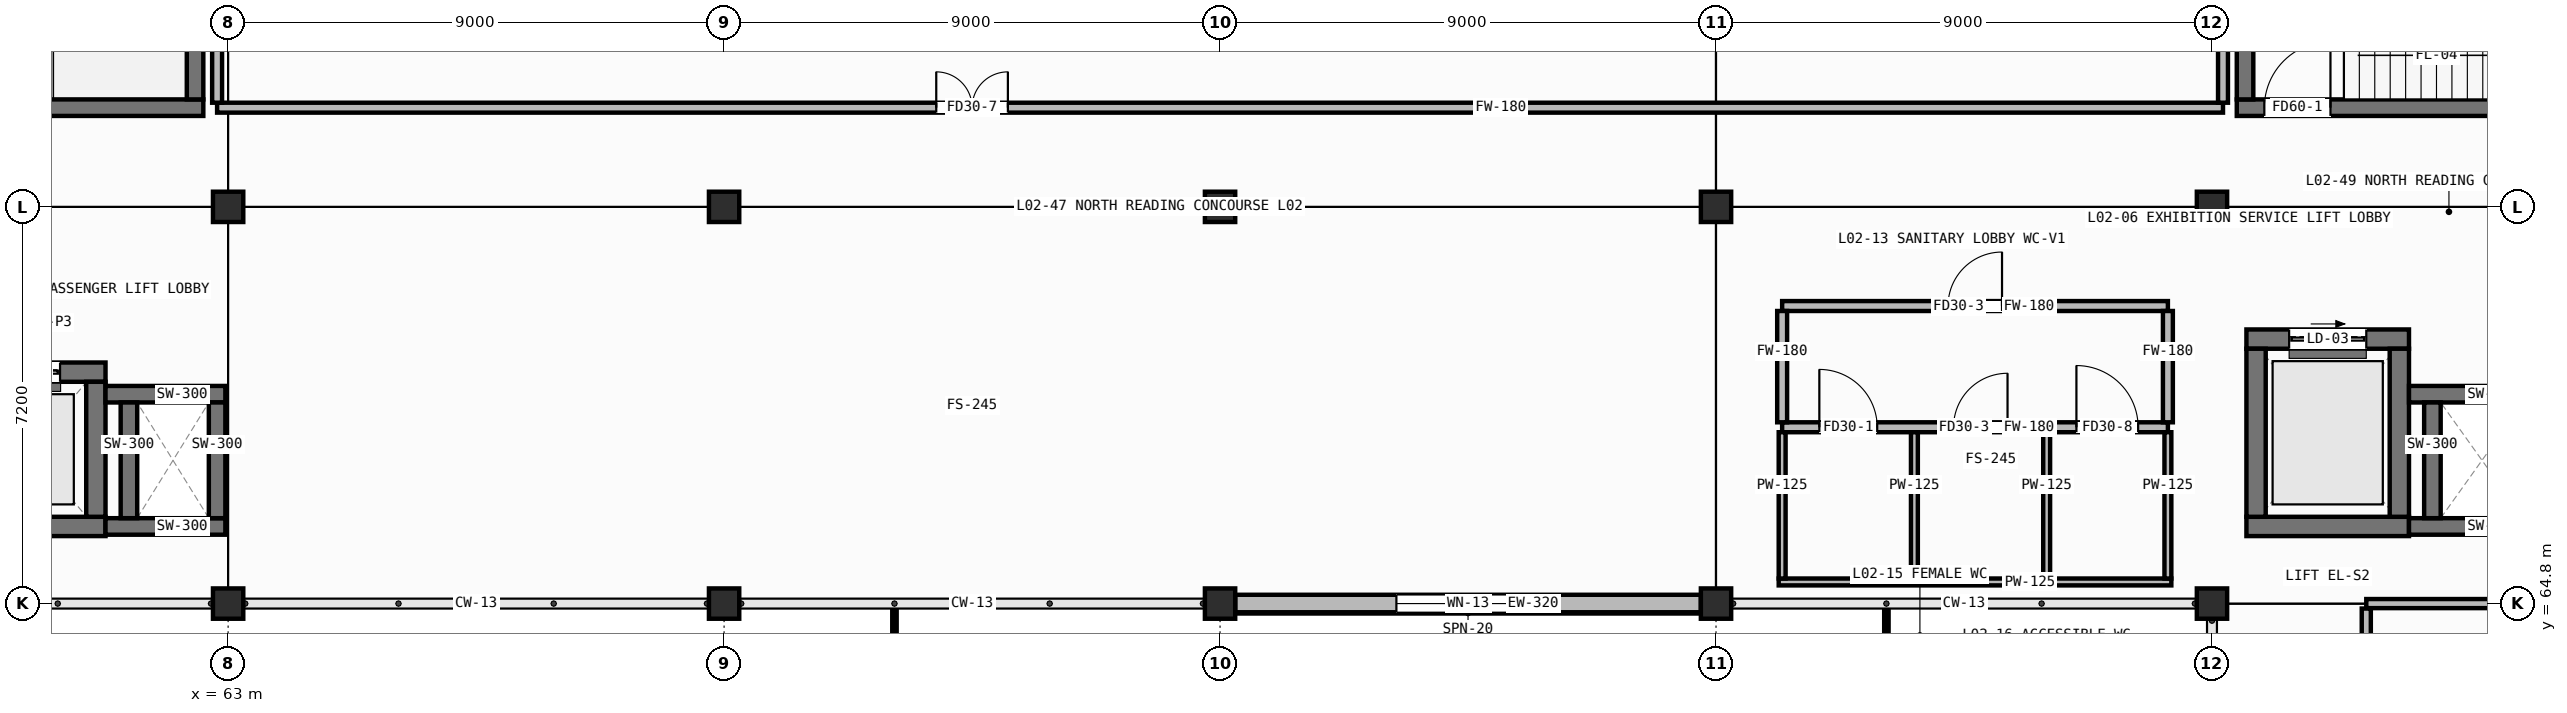
"""IFC4 building model, lengths in metres.
Left out: names, types, materials, properties, quantities, classifications, styles, units other than length and angle.
Written with IfcOpenShell. Run it as: python <this file> out.ifc"""

import sys

from ifc_helpers import new_model, si_unit, direction, frame, frame_2d, origin, origin_2d, place, context, subcontext, project, spatial, rectangle, hollow_rectangle, extrude, element, fill, save


model = new_model("IFC4")
c1 = context("Model", 3, precision=1e-05, world=origin(), true_north=direction((0.0, 1.0)))
c2 = subcontext(c1, "Body", "Model", "MODEL_VIEW")
j1 = project(units=[si_unit("LENGTHUNIT", "METRE"), si_unit("PLANEANGLEUNIT", "RADIAN")], contexts=[c1])
p1 = place(None, origin())
s1 = spatial("IfcSite", under=j1, at=p1, CompositionType="ELEMENT")
p2 = place(p1, origin())
s2 = spatial("IfcBuilding", under=s1, at=p2, CompositionType="ELEMENT")
p3 = place(p2, frame((0.0, 0.0, 4.8)))
s3 = spatial("IfcBuildingStorey", under=s2, at=p3, CompositionType="ELEMENT", Elevation=4.8)
for number, where, z_axis, x_axis in (
    (1, (63.0, 64.8, 0.0), (0.0, 0.0, 1.0), (1.0, 0.0, 0.0)),
    (2, (63.0, 72.0, 0.0), (0.0, 0.0, 1.0), (1.0, 0.0, 0.0)),
    (3, (72.0, 64.8, 0.0), (0.0, 0.0, 1.0), (1.0, 0.0, 0.0)),
    (4, (72.0, 72.0, 0.0), (0.0, 0.0, 1.0), (1.0, 0.0, 0.0)),
    (5, (81.0, 64.8, 0.0), (0.0, 0.0, 1.0), (1.0, 0.0, 0.0)),
    (6, (81.0, 72.0, 0.0), (0.0, 0.0, 1.0), (1.0, 0.0, 0.0)),
    (7, (90.0, 64.8, 0.0), (0.0, 0.0, 1.0), (1.0, 0.0, 0.0)),
    (8, (90.0, 72.0, 0.0), (0.0, 0.0, 1.0), (1.0, 0.0, 0.0)),
    (9, (99.0, 64.8, 0.0), (0.0, 0.0, 1.0), (1.0, 0.0, 0.0)),
    (10, (99.0, 72.0, 0.0), (0.0, 0.0, 1.0), (1.0, 0.0, 0.0)),
):
    element("IfcColumn", number, at=place(p3, frame(where, z_axis=z_axis, x_axis=x_axis)), inside=s3, PredefinedType="COLUMN", context=c2, shape_type="SweptSolid", body=[
        extrude(hollow_rectangle(XDim=0.55, YDim=0.55, WallThickness=0.022, at=origin_2d()), origin(), (0.0, 0.0, 1.0), 4.0),
    ])
p4 = place(p3, frame((81.275, 64.8, 0.0), z_axis=(0.0, 0.0, 1.0), x_axis=(1.0, 0.0, 0.0)))
e11 = element("IfcWall", 11, at=p4, inside=s3, PredefinedType="STANDARD", context=c2, shape_type="SweptSolid", body=[
    extrude(rectangle(XDim=8.45, YDim=0.32, at=frame_2d((4.225, 0.0))), origin(), (0.0, 0.0, 1.0), 3.255),
])
p5 = place(p4, frame((2.925, 0.0, 0.85)))
e12 = element("IfcOpeningElement", 12, at=p5, cuts=e11, PredefinedType="OPENING", context=c2, shape_type="SweptSolid", body=[
    extrude(rectangle(XDim=2.6, YDim=1.6, at=frame_2d((1.3, 0.8))), frame((0.0, 0.172, 0.0), z_axis=(0.0, -1.0, 0.0), x_axis=(1.0, 0.0, 0.0)), (0.0, 0.0, 1.0), 0.344),
])
p6 = place(p3, frame((54.45, 73.8, 0.0), z_axis=(0.0, 0.0, 1.0), x_axis=(1.0, 0.0, 0.0)))
e13 = element("IfcWall", 13, at=p6, inside=s3, PredefinedType="SHEAR", context=c2, shape_type="SweptSolid", body=[
    extrude(rectangle(XDim=8.1, YDim=0.3, at=frame_2d((4.05, 0.0))), origin(), (0.0, 0.0, 1.0), 3.755),
])
p7 = place(p6, frame((0.5, 0.0, 0.0)))
e14 = element("IfcOpeningElement", 14, at=p7, cuts=e13, PredefinedType="OPENING", context=c2, shape_type="SweptSolid", body=[
    extrude(rectangle(XDim=1.2, YDim=2.1, at=frame_2d((0.6, 1.05))), frame((0.0, 0.162, 0.0), z_axis=(0.0, -1.0, 0.0), x_axis=(1.0, 0.0, 0.0)), (0.0, 0.0, 1.0), 0.324),
])
p8 = place(p3, frame((62.4, 73.95, 0.0), z_axis=(0.0, 0.0, 1.0), x_axis=(0.0, 1.0, 0.0)))
e15 = element("IfcWall", 15, at=p8, inside=s3, PredefinedType="SHEAR", context=c2, shape_type="SweptSolid", body=[
    extrude(rectangle(XDim=3.8, YDim=0.3, at=frame_2d((1.9, 0.0))), origin(), (0.0, 0.0, 1.0), 3.755),
])
p9 = place(p3, frame((99.45, 73.8, 0.0), z_axis=(0.0, 0.0, 1.0), x_axis=(1.0, 0.0, 0.0)))
e16 = element("IfcWall", 16, at=p9, inside=s3, PredefinedType="SHEAR", context=c2, shape_type="SweptSolid", body=[
    extrude(rectangle(XDim=8.1, YDim=0.3, at=frame_2d((4.05, 0.0))), origin(), (0.0, 0.0, 1.0), 3.755),
])
p10 = place(p9, frame((0.5, 0.0, 0.0)))
e17 = element("IfcOpeningElement", 17, at=p10, cuts=e16, PredefinedType="OPENING", context=c2, shape_type="SweptSolid", body=[
    extrude(rectangle(XDim=1.2, YDim=2.1, at=frame_2d((0.6, 1.05))), frame((0.0, 0.162, 0.0), z_axis=(0.0, -1.0, 0.0), x_axis=(1.0, 0.0, 0.0)), (0.0, 0.0, 1.0), 0.324),
])
p11 = place(p3, frame((99.6, 73.95, 0.0), z_axis=(0.0, 0.0, 1.0), x_axis=(0.0, 1.0, 0.0)))
e18 = element("IfcWall", 18, at=p11, inside=s3, PredefinedType="SHEAR", context=c2, shape_type="SweptSolid", body=[
    extrude(rectangle(XDim=3.8, YDim=0.3, at=frame_2d((1.9, 0.0))), origin(), (0.0, 0.0, 1.0), 3.755),
])
p12 = place(p3, frame((58.025, 66.2, 0.0), z_axis=(0.0, 0.0, 1.0), x_axis=(1.0, 0.0, 0.0)))
e19 = element("IfcWall", 19, at=p12, inside=s3, PredefinedType="SHEAR", context=c2, shape_type="SweptSolid", body=[
    extrude(rectangle(XDim=2.75, YDim=0.35, at=frame_2d((1.375, 0.0))), origin(), (0.0, 0.0, 1.0), 3.755),
])
p13 = place(p3, frame((58.025, 69.0, 0.0), z_axis=(0.0, 0.0, 1.0), x_axis=(1.0, 0.0, 0.0)))
e20 = element("IfcWall", 20, at=p13, inside=s3, PredefinedType="SHEAR", context=c2, shape_type="SweptSolid", body=[
    extrude(rectangle(XDim=2.75, YDim=0.35, at=frame_2d((1.375, 0.0))), origin(), (0.0, 0.0, 1.0), 3.755),
])
p14 = place(p13, frame((0.825, 0.0, 0.0)))
e21 = element("IfcOpeningElement", 21, at=p14, cuts=e20, PredefinedType="OPENING", context=c2, shape_type="SweptSolid", body=[
    extrude(rectangle(XDim=1.1, YDim=2.1, at=frame_2d((0.55, 1.05))), frame((0.0, 0.187, 0.0), z_axis=(0.0, -1.0, 0.0), x_axis=(1.0, 0.0, 0.0)), (0.0, 0.0, 1.0), 0.374),
])
p15 = place(p3, frame((60.6, 66.375, 0.0), z_axis=(0.0, 0.0, 1.0), x_axis=(0.0, 1.0, 0.0)))
e22 = element("IfcWall", 22, at=p15, inside=s3, PredefinedType="SHEAR", context=c2, shape_type="SweptSolid", body=[
    extrude(rectangle(XDim=2.45, YDim=0.35, at=frame_2d((1.225, 0.0))), origin(), (0.0, 0.0, 1.0), 3.755),
])
p16 = place(p3, frame((99.625, 66.2, 0.0), z_axis=(0.0, 0.0, 1.0), x_axis=(1.0, 0.0, 0.0)))
e23 = element("IfcWall", 23, at=p16, inside=s3, PredefinedType="SHEAR", context=c2, shape_type="SweptSolid", body=[
    extrude(rectangle(XDim=2.95, YDim=0.35, at=frame_2d((1.475, 0.0))), origin(), (0.0, 0.0, 1.0), 3.755),
])
p17 = place(p3, frame((99.625, 69.6, 0.0), z_axis=(0.0, 0.0, 1.0), x_axis=(1.0, 0.0, 0.0)))
e24 = element("IfcWall", 24, at=p17, inside=s3, PredefinedType="SHEAR", context=c2, shape_type="SweptSolid", body=[
    extrude(rectangle(XDim=2.95, YDim=0.35, at=frame_2d((1.475, 0.0))), origin(), (0.0, 0.0, 1.0), 3.755),
])
p18 = place(p17, frame((0.775, 0.0, 0.0)))
e25 = element("IfcOpeningElement", 25, at=p18, cuts=e24, PredefinedType="OPENING", context=c2, shape_type="SweptSolid", body=[
    extrude(rectangle(XDim=1.4, YDim=2.15, at=frame_2d((0.7, 1.075))), frame((0.0, 0.187, 0.0), z_axis=(0.0, -1.0, 0.0), x_axis=(1.0, 0.0, 0.0)), (0.0, 0.0, 1.0), 0.374),
])
for number, where, z_axis, x_axis in (
    (26, (99.8, 66.375, 0.0), (0.0, 0.0, 1.0), (0.0, 1.0, 0.0)),
    (27, (102.4, 66.375, 0.0), (0.0, 0.0, 1.0), (0.0, 1.0, 0.0)),
):
    element("IfcWall", number, at=place(p3, frame(where, z_axis=z_axis, x_axis=x_axis)), inside=s3, PredefinedType="SHEAR", context=c2, shape_type="SweptSolid", body=[
        extrude(rectangle(XDim=3.05, YDim=0.35, at=frame_2d((1.525, 0.0))), origin(), (0.0, 0.0, 1.0), 3.755),
    ])
for number, where, z_axis, x_axis in (
    (28, (60.775, 66.2, 0.0), (0.0, 0.0, 1.0), (1.0, 0.0, 0.0)),
    (29, (60.775, 68.6, 0.0), (0.0, 0.0, 1.0), (1.0, 0.0, 0.0)),
):
    element("IfcWall", number, at=place(p3, frame(where, z_axis=z_axis, x_axis=x_axis)), inside=s3, PredefinedType="SHEAR", context=c2, shape_type="SweptSolid", body=[
        extrude(rectangle(XDim=2.175, YDim=0.3, at=frame_2d((1.087, 0.0))), origin(), (0.0, 0.0, 1.0), 3.755),
    ])
for number, where, z_axis, x_axis in (
    (30, (61.2, 66.35, 0.0), (0.0, 0.0, 1.0), (0.0, 1.0, 0.0)),
    (31, (62.8, 66.35, 0.0), (0.0, 0.0, 1.0), (0.0, 1.0, 0.0)),
):
    element("IfcWall", number, at=place(p3, frame(where, z_axis=z_axis, x_axis=x_axis)), inside=s3, PredefinedType="SHEAR", context=c2, shape_type="SweptSolid", body=[
        extrude(rectangle(XDim=2.1, YDim=0.3, at=frame_2d((1.05, 0.0))), origin(), (0.0, 0.0, 1.0), 3.755),
    ])
for number, where, z_axis, x_axis in (
    (32, (102.575, 66.2, 0.0), (0.0, 0.0, 1.0), (1.0, 0.0, 0.0)),
    (33, (102.575, 68.6, 0.0), (0.0, 0.0, 1.0), (1.0, 0.0, 0.0)),
):
    element("IfcWall", number, at=place(p3, frame(where, z_axis=z_axis, x_axis=x_axis)), inside=s3, PredefinedType="SHEAR", context=c2, shape_type="SweptSolid", body=[
        extrude(rectangle(XDim=2.375, YDim=0.3, at=frame_2d((1.188, 0.0))), origin(), (0.0, 0.0, 1.0), 3.755),
    ])
p19 = place(p3, frame((103.0, 66.35, 0.0), z_axis=(0.0, 0.0, 1.0), x_axis=(0.0, 1.0, 0.0)))
e34 = element("IfcWall", 34, at=p19, inside=s3, PredefinedType="SHEAR", context=c2, shape_type="SweptSolid", body=[
    extrude(rectangle(XDim=2.1, YDim=0.3, at=frame_2d((1.05, 0.0))), origin(), (0.0, 0.0, 1.0), 3.755),
])
p20 = place(p3, frame((91.137, 65.192, 0.0), z_axis=(0.0, 0.0, 1.0), x_axis=(1.0, 0.0, 0.0)))
e35 = element("IfcWall", 35, at=p20, inside=s3, PredefinedType="PARTITIONING", context=c2, shape_type="SweptSolid", body=[
    extrude(rectangle(XDim=7.125, YDim=0.125, at=frame_2d((3.562, 0.0))), origin(), (0.0, 0.0, 1.0), 3.755),
])
p21 = place(p3, frame((91.2, 68.0, 0.0), z_axis=(0.0, 0.0, 1.0), x_axis=(1.0, 0.0, 0.0)))
e36 = element("IfcWall", 36, at=p21, inside=s3, PredefinedType="PARTITIONING", context=c2, shape_type="SweptSolid", body=[
    extrude(rectangle(XDim=7.0, YDim=0.18, at=frame_2d((3.5, 0.0))), origin(), (0.0, 0.0, 1.0), 3.755),
])
p22 = place(p21, frame((0.675, 0.0, 0.0)))
e37 = element("IfcOpeningElement", 37, at=p22, cuts=e36, PredefinedType="OPENING", context=c2, shape_type="SweptSolid", body=[
    extrude(rectangle(XDim=1.05, YDim=2.1, at=frame_2d((0.525, 1.05))), frame((0.0, 0.102, 0.0), z_axis=(0.0, -1.0, 0.0), x_axis=(1.0, 0.0, 0.0)), (0.0, 0.0, 1.0), 0.204),
])
p23 = place(p21, frame((3.11, 0.0, 0.0)))
e38 = element("IfcOpeningElement", 38, at=p23, cuts=e36, PredefinedType="OPENING", context=c2, shape_type="SweptSolid", body=[
    extrude(rectangle(XDim=0.98, YDim=2.02, at=frame_2d((0.49, 1.01))), frame((0.0, 0.102, 0.0), z_axis=(0.0, -1.0, 0.0), x_axis=(1.0, 0.0, 0.0)), (0.0, 0.0, 1.0), 0.204),
])
p24 = place(p21, frame((5.34, 0.0, 0.0)))
e39 = element("IfcOpeningElement", 39, at=p24, cuts=e36, PredefinedType="OPENING", context=c2, shape_type="SweptSolid", body=[
    extrude(rectangle(XDim=1.12, YDim=2.08, at=frame_2d((0.56, 1.04))), frame((0.0, 0.102, 0.0), z_axis=(0.0, -1.0, 0.0), x_axis=(1.0, 0.0, 0.0)), (0.0, 0.0, 1.0), 0.204),
])
p25 = place(p3, frame((91.2, 70.2, 0.0), z_axis=(0.0, 0.0, 1.0), x_axis=(1.0, 0.0, 0.0)))
e40 = element("IfcWall", 40, at=p25, inside=s3, PredefinedType="PARTITIONING", context=c2, shape_type="SweptSolid", body=[
    extrude(rectangle(XDim=7.0, YDim=0.18, at=frame_2d((3.5, 0.0))), origin(), (0.0, 0.0, 1.0), 3.755),
])
p26 = place(p25, frame((3.01, 0.0, 0.0)))
e41 = element("IfcOpeningElement", 41, at=p26, cuts=e40, PredefinedType="OPENING", context=c2, shape_type="SweptSolid", body=[
    extrude(rectangle(XDim=0.98, YDim=2.02, at=frame_2d((0.49, 1.01))), frame((0.0, 0.102, 0.0), z_axis=(0.0, -1.0, 0.0), x_axis=(1.0, 0.0, 0.0)), (0.0, 0.0, 1.0), 0.204),
])
for number, where, z_axis, x_axis in (
    (42, (91.2, 68.09, 0.0), (0.0, 0.0, 1.0), (0.0, 1.0, 0.0)),
    (43, (98.2, 68.09, 0.0), (0.0, 0.0, 1.0), (0.0, 1.0, 0.0)),
):
    element("IfcWall", number, at=place(p3, frame(where, z_axis=z_axis, x_axis=x_axis)), inside=s3, PredefinedType="PARTITIONING", context=c2, shape_type="SweptSolid", body=[
        extrude(rectangle(XDim=2.02, YDim=0.18, at=frame_2d((1.01, 0.0))), origin(), (0.0, 0.0, 1.0), 3.755),
    ])
for number, where, z_axis, x_axis in (
    (44, (91.2, 65.255, 0.0), (0.0, 0.0, 1.0), (0.0, 1.0, 0.0)),
    (45, (93.6, 65.255, 0.0), (0.0, 0.0, 1.0), (0.0, 1.0, 0.0)),
    (46, (96.0, 65.255, 0.0), (0.0, 0.0, 1.0), (0.0, 1.0, 0.0)),
    (47, (98.2, 65.255, 0.0), (0.0, 0.0, 1.0), (0.0, 1.0, 0.0)),
):
    element("IfcWall", number, at=place(p3, frame(where, z_axis=z_axis, x_axis=x_axis)), inside=s3, PredefinedType="PARTITIONING", context=c2, shape_type="SweptSolid", body=[
        extrude(rectangle(XDim=2.655, YDim=0.125, at=frame_2d((1.328, 0.0))), origin(), (0.0, 0.0, 1.0), 3.755),
    ])
p27 = place(p3, frame((101.8, 64.8, 0.0), z_axis=(0.0, 0.0, 1.0), x_axis=(1.0, 0.0, 0.0)))
e48 = element("IfcWall", 48, at=p27, inside=s3, PredefinedType="PARTITIONING", context=c2, shape_type="SweptSolid", body=[
    extrude(rectangle(XDim=5.78, YDim=0.165, at=frame_2d((2.89, 0.0))), origin(), (0.0, 0.0, 1.0), 3.035),
])
p28 = place(p3, frame((101.8, 36.09, 0.0), z_axis=(0.0, 0.0, 1.0), x_axis=(0.0, 1.0, 0.0)))
e49 = element("IfcWall", 49, at=p28, inside=s3, PredefinedType="PARTITIONING", context=c2, shape_type="SweptSolid", body=[
    extrude(rectangle(XDim=28.62, YDim=0.165, at=frame_2d((14.31, 0.0))), origin(), (0.0, 0.0, 1.0), 3.755),
])
p29 = place(p28, frame((15.11, 0.0, 0.0)))
e50 = element("IfcOpeningElement", 50, at=p29, cuts=e49, PredefinedType="OPENING", context=c2, shape_type="SweptSolid", body=[
    extrude(rectangle(XDim=1.45, YDim=2.1, at=frame_2d((0.725, 1.05))), frame((0.0, 0.094, 0.0), z_axis=(0.0, -1.0, 0.0), x_axis=(1.0, 0.0, 0.0)), (0.0, 0.0, 1.0), 0.189),
])
p30 = place(p3, frame((62.8, 73.8, 0.0), z_axis=(0.0, 0.0, 1.0), x_axis=(1.0, 0.0, 0.0)))
e51 = element("IfcWall", 51, at=p30, inside=s3, PredefinedType="PARTITIONING", context=c2, shape_type="SweptSolid", body=[
    extrude(rectangle(XDim=36.4, YDim=0.18, at=frame_2d((18.2, 0.0))), origin(), (0.0, 0.0, 1.0), 3.755),
])
p31 = place(p30, frame((13.05, 0.0, 0.0)))
e52 = element("IfcOpeningElement", 52, at=p31, cuts=e51, PredefinedType="OPENING", context=c2, shape_type="SweptSolid", body=[
    extrude(rectangle(XDim=1.3, YDim=2.08, at=frame_2d((0.65, 1.04))), frame((0.0, 0.102, 0.0), z_axis=(0.0, -1.0, 0.0), x_axis=(1.0, 0.0, 0.0)), (0.0, 0.0, 1.0), 0.204),
])
for number, where, z_axis, x_axis in (
    (53, (62.8, 73.89, 0.0), (0.0, 0.0, 1.0), (0.0, 1.0, 0.0)),
    (54, (99.2, 73.89, 0.0), (0.0, 0.0, 1.0), (0.0, 1.0, 0.0)),
):
    element("IfcWall", number, at=place(p3, frame(where, z_axis=z_axis, x_axis=x_axis)), inside=s3, PredefinedType="PARTITIONING", context=c2, shape_type="SweptSolid", body=[
        extrude(rectangle(XDim=11.42, YDim=0.18, at=frame_2d((5.71, 0.0))), origin(), (0.0, 0.0, 1.0), 3.035),
    ])
p32 = place(p5, origin())
e55 = element("IfcWindow", 55, at=p32, inside=s3, PartitioningType="DOUBLE_PANEL_VERTICAL", PredefinedType="WINDOW", context=c2, shape_type="SweptSolid", body=[
    extrude(rectangle(XDim=2.6, YDim=1.6, at=frame_2d((1.3, 0.8))), frame((0.0, 0.03, 0.0), z_axis=(0.0, -1.0, 0.0), x_axis=(1.0, 0.0, 0.0)), (0.0, 0.0, 1.0), 0.06),
])
fill(e12, e55)
p33 = place(p10, origin())
e56 = element("IfcDoor", 56, at=p33, inside=s3, OperationType="SINGLE_SWING_RIGHT", PredefinedType="DOOR", context=c2, shape_type="SweptSolid", body=[
    extrude(rectangle(XDim=1.2, YDim=2.1, at=frame_2d((0.6, 1.05))), frame((0.0, 0.025, 0.0), z_axis=(0.0, -1.0, 0.0), x_axis=(1.0, 0.0, 0.0)), (0.0, 0.0, 1.0), 0.05),
])
fill(e17, e56)
p34 = place(p14, origin())
e57 = element("IfcDoor", 57, at=p34, inside=s3, OperationType="SLIDING_TO_RIGHT", PredefinedType="DOOR", context=c2, shape_type="SweptSolid", body=[
    extrude(rectangle(XDim=1.1, YDim=2.1, at=frame_2d((0.55, 1.05))), frame((0.0, 0.025, 0.0), z_axis=(0.0, -1.0, 0.0), x_axis=(1.0, 0.0, 0.0)), (0.0, 0.0, 1.0), 0.05),
])
fill(e21, e57)
p35 = place(p18, origin())
e58 = element("IfcDoor", 58, at=p35, inside=s3, OperationType="SLIDING_TO_RIGHT", PredefinedType="DOOR", context=c2, shape_type="SweptSolid", body=[
    extrude(rectangle(XDim=1.4, YDim=2.15, at=frame_2d((0.7, 1.075))), frame((0.0, 0.025, 0.0), z_axis=(0.0, -1.0, 0.0), x_axis=(1.0, 0.0, 0.0)), (0.0, 0.0, 1.0), 0.05),
])
fill(e25, e58)
p36 = place(p26, origin())
e59 = element("IfcDoor", 59, at=p36, inside=s3, OperationType="SINGLE_SWING_RIGHT", PredefinedType="DOOR", context=c2, shape_type="SweptSolid", body=[
    extrude(rectangle(XDim=0.98, YDim=2.02, at=frame_2d((0.49, 1.01))), frame((0.0, 0.025, 0.0), z_axis=(0.0, -1.0, 0.0), x_axis=(1.0, 0.0, 0.0)), (0.0, 0.0, 1.0), 0.05),
])
fill(e41, e59)
p37 = place(p22, origin())
e60 = element("IfcDoor", 60, at=p37, inside=s3, OperationType="SINGLE_SWING_LEFT", PredefinedType="DOOR", context=c2, shape_type="SweptSolid", body=[
    extrude(rectangle(XDim=1.05, YDim=2.1, at=frame_2d((0.525, 1.05))), frame((0.0, 0.025, 0.0), z_axis=(0.0, -1.0, 0.0), x_axis=(1.0, 0.0, 0.0)), (0.0, 0.0, 1.0), 0.05),
])
fill(e37, e60)
p38 = place(p23, origin())
e61 = element("IfcDoor", 61, at=p38, inside=s3, OperationType="SINGLE_SWING_RIGHT", PredefinedType="DOOR", context=c2, shape_type="SweptSolid", body=[
    extrude(rectangle(XDim=0.98, YDim=2.02, at=frame_2d((0.49, 1.01))), frame((0.0, 0.025, 0.0), z_axis=(0.0, -1.0, 0.0), x_axis=(1.0, 0.0, 0.0)), (0.0, 0.0, 1.0), 0.05),
])
fill(e38, e61)
p39 = place(p24, origin())
e62 = element("IfcDoor", 62, at=p39, inside=s3, OperationType="SINGLE_SWING_LEFT", PredefinedType="DOOR", context=c2, shape_type="SweptSolid", body=[
    extrude(rectangle(XDim=1.12, YDim=2.08, at=frame_2d((0.56, 1.04))), frame((0.0, 0.025, 0.0), z_axis=(0.0, -1.0, 0.0), x_axis=(1.0, 0.0, 0.0)), (0.0, 0.0, 1.0), 0.05),
])
fill(e39, e62)
p40 = place(p31, origin())
e63 = element("IfcDoor", 63, at=p40, inside=s3, OperationType="DOUBLE_DOOR_SINGLE_SWING", PredefinedType="DOOR", context=c2, shape_type="SweptSolid", body=[
    extrude(rectangle(XDim=1.3, YDim=2.08, at=frame_2d((0.65, 1.04))), frame((0.0, 0.025, 0.0), z_axis=(0.0, -1.0, 0.0), x_axis=(1.0, 0.0, 0.0)), (0.0, 0.0, 1.0), 0.05),
])
fill(e52, e63)
save(model, sys.argv[1])
